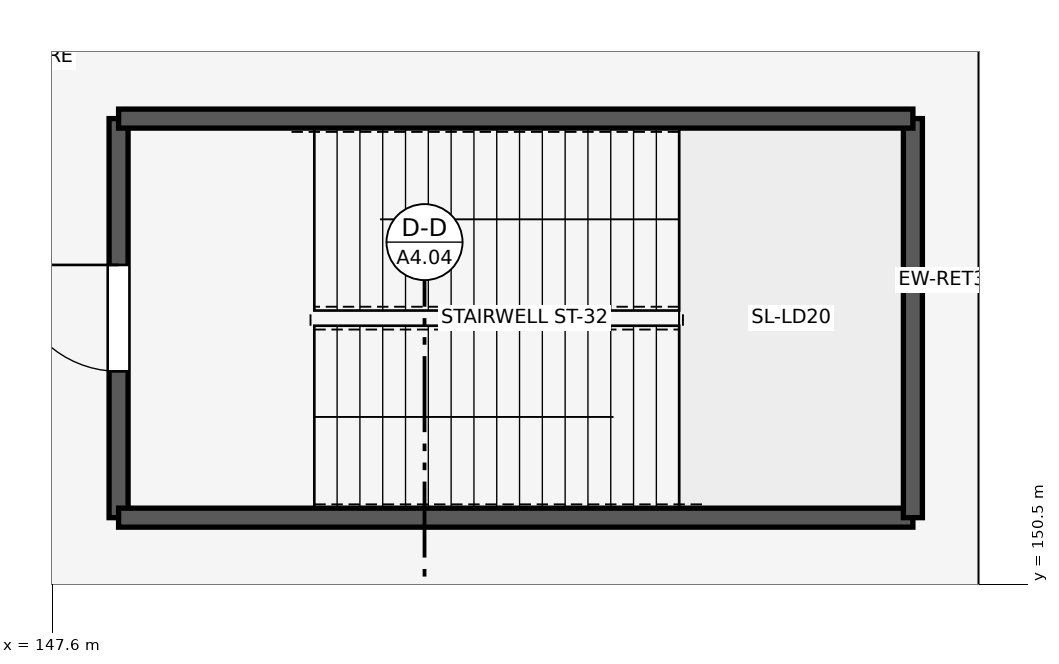
"""IFC4 building model, lengths in metres.
Left out: names, types, materials, properties, quantities, classifications, styles, units other than length and angle.
Written with IfcOpenShell. Run it as: python <this file> out.ifc"""

import sys

from ifc_helpers import new_model, si_unit, direction, frame, frame_2d, origin, place, context, subcontext, project, spatial, rectangle, extrude, element, fill, save


model = new_model("IFC4")
c1 = context("Model", 3, precision=1e-05, world=origin(), true_north=direction((0.0, 1.0)))
c2 = subcontext(c1, "Body", "Model", "MODEL_VIEW")
j1 = project(units=[si_unit("LENGTHUNIT", "METRE"), si_unit("PLANEANGLEUNIT", "RADIAN")], contexts=[c1])
p1 = place(None, origin())
s1 = spatial("IfcSite", under=j1, at=p1, CompositionType="ELEMENT")
p2 = place(p1, origin())
s2 = spatial("IfcBuilding", under=s1, at=p2, CompositionType="ELEMENT")
p3 = place(p2, frame((0.0, 0.0, -5.4)))
s3 = spatial("IfcBuildingStorey", under=s2, at=p3, CompositionType="ELEMENT", Elevation=-5.4)
p4 = place(p3, frame((148.475, 156.625, 0.0), z_axis=(0.0, 0.0, 1.0), x_axis=(0.0, -1.0, 0.0)))
e1 = element("IfcWall", 1, at=p4, inside=s3, PredefinedType="SHEAR", context=c2, shape_type="SweptSolid", body=[
    extrude(rectangle(XDim=5.25, YDim=0.25, at=frame_2d((2.625, 0.0))), origin(), (0.0, 0.0, 1.0), 5.05),
])
p5 = place(p4, frame((1.925, 0.0, 0.0)))
e2 = element("IfcOpeningElement", 2, at=p5, cuts=e1, PredefinedType="OPENING", context=c2, shape_type="SweptSolid", body=[
    extrude(rectangle(XDim=1.4, YDim=2.2, at=frame_2d((0.7, 1.1))), frame((0.0, 0.135, 0.0), z_axis=(0.0, -1.0, 0.0), x_axis=(1.0, 0.0, 0.0)), (0.0, 0.0, 1.0), 0.27),
])
p6 = place(p3, frame((148.475, 151.375, 0.0), z_axis=(0.0, 0.0, 1.0), x_axis=(1.0, 0.0, 0.0)))
e3 = element("IfcWall", 3, at=p6, inside=s3, PredefinedType="SHEAR", context=c2, shape_type="SweptSolid", body=[
    extrude(rectangle(XDim=10.45, YDim=0.25, at=frame_2d((5.225, 0.0))), origin(), (0.0, 0.0, 1.0), 5.05),
])
p7 = place(p3, frame((158.925, 151.375, 0.0), z_axis=(0.0, 0.0, 1.0), x_axis=(0.0, 1.0, 0.0)))
e4 = element("IfcWall", 4, at=p7, inside=s3, PredefinedType="SHEAR", context=c2, shape_type="SweptSolid", body=[
    extrude(rectangle(XDim=5.25, YDim=0.25, at=frame_2d((2.625, 0.0))), origin(), (0.0, 0.0, 1.0), 5.05),
])
p8 = place(p3, frame((158.925, 156.625, 0.0), z_axis=(0.0, 0.0, 1.0), x_axis=(-1.0, 0.0, 0.0)))
e5 = element("IfcWall", 5, at=p8, inside=s3, PredefinedType="SHEAR", context=c2, shape_type="SweptSolid", body=[
    extrude(rectangle(XDim=10.45, YDim=0.25, at=frame_2d((5.225, 0.0))), origin(), (0.0, 0.0, 1.0), 5.05),
])
p9 = place(p5, frame((1.4, 0.0, 0.0), z_axis=(0.0, 0.0, 1.0), x_axis=(-1.0, 0.0, 0.0)))
e6 = element("IfcDoor", 6, at=p9, inside=s3, OperationType="SINGLE_SWING_RIGHT", PredefinedType="DOOR", context=c2, shape_type="SweptSolid", body=[
    extrude(rectangle(XDim=1.4, YDim=2.2, at=frame_2d((0.7, 1.1))), frame((0.0, 0.025, 0.0), z_axis=(0.0, -1.0, 0.0), x_axis=(1.0, 0.0, 0.0)), (0.0, 0.0, 1.0), 0.05),
])
fill(e2, e6)
save(model, sys.argv[1])
